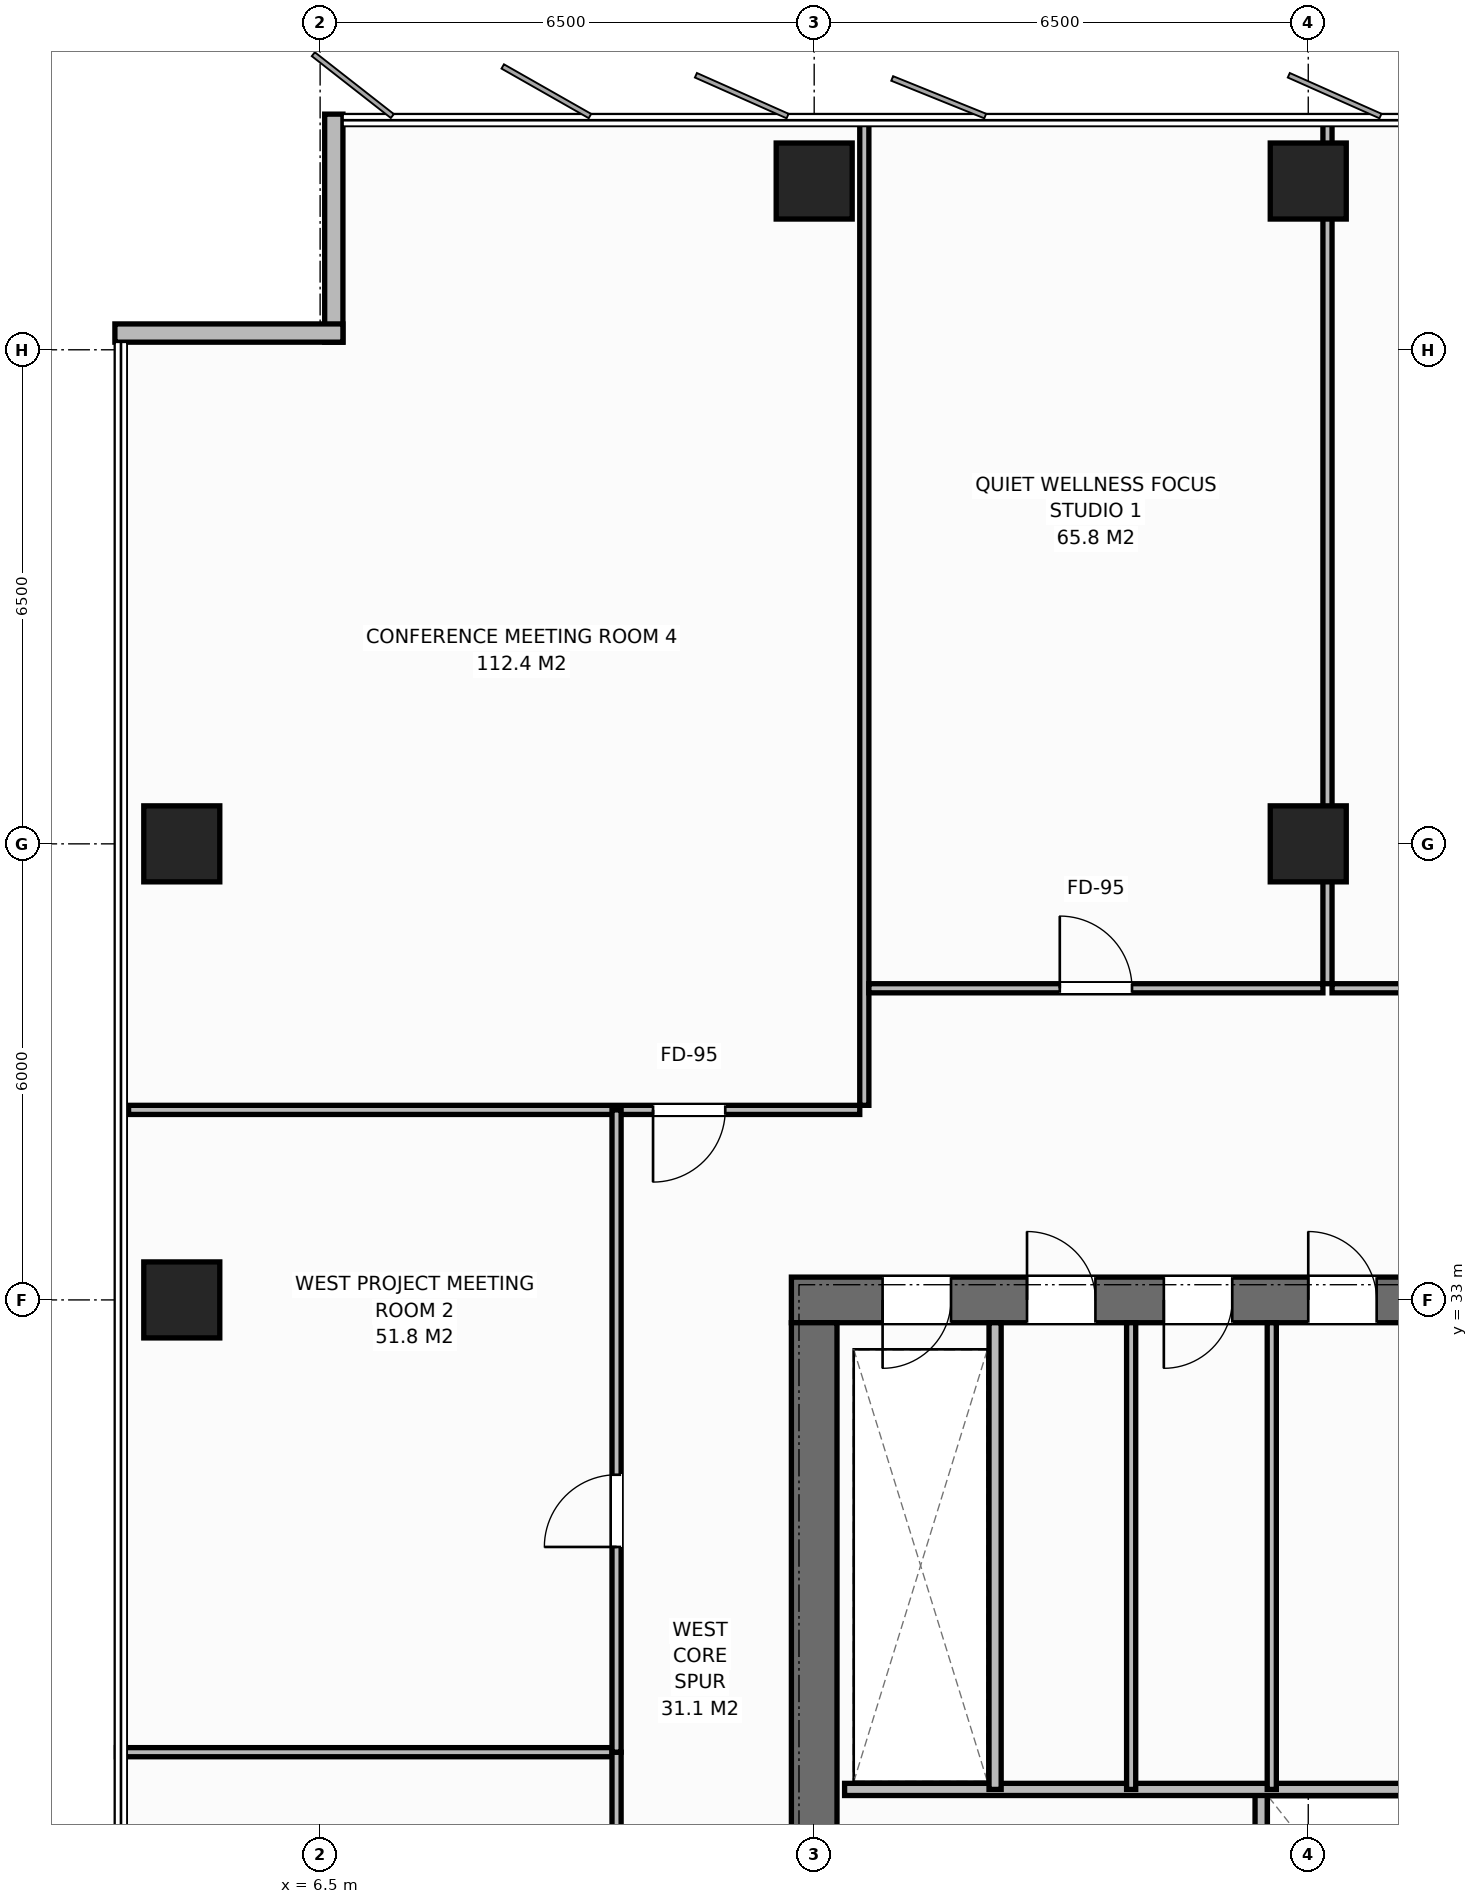
"""IFC4 building model, lengths in metres.
Left out: names, types, materials, properties, quantities, classifications, styles, units other than length and angle.
Written with IfcOpenShell. Run it as: python <this file> out.ifc"""

import sys

from ifc_helpers import new_model, si_unit, direction, frame, frame_2d, origin, origin_2d, place, context, subcontext, project, spatial, rectangle, extrude, element, fill, save


model = new_model("IFC4")
c1 = context("Model", 3, precision=1e-05, world=origin(), true_north=direction((0.0, 1.0)))
c2 = subcontext(c1, "Body", "Model", "MODEL_VIEW")
j1 = project(units=[si_unit("LENGTHUNIT", "METRE"), si_unit("PLANEANGLEUNIT", "RADIAN")], contexts=[c1])
p1 = place(None, origin())
s1 = spatial("IfcSite", under=j1, at=p1, CompositionType="ELEMENT")
p2 = place(p1, origin())
s2 = spatial("IfcBuilding", under=s1, at=p2, CompositionType="ELEMENT")
p3 = place(p2, frame((0.0, 0.0, 178.4)))
s3 = spatial("IfcBuildingStorey", under=s2, at=p3, CompositionType="ELEMENT", Elevation=178.4)
p4 = place(p3, frame((12.7, 33.0, 0.0), z_axis=(0.0, 0.0, 1.0), x_axis=(1.0, 0.0, 0.0)))
e1 = element("IfcWall", 1, at=p4, inside=s3, PredefinedType="SHEAR", context=c2, shape_type="SweptSolid", body=[
    extrude(rectangle(XDim=13.6, YDim=0.6, at=frame_2d((6.8, 0.0))), origin(), (0.0, 0.0, 1.0), 3.8),
])
p5 = place(p4, frame((1.2, 0.0, 0.0)))
e2 = element("IfcOpeningElement", 2, at=p5, cuts=e1, PredefinedType="OPENING", context=c2, shape_type="SweptSolid", body=[
    extrude(rectangle(XDim=0.9, YDim=2.15, at=frame_2d((0.45, 1.075))), frame((0.0, 0.31, 0.0), z_axis=(0.0, -1.0, 0.0), x_axis=(1.0, 0.0, 0.0)), (0.0, 0.0, 1.0), 0.62),
])
p6 = place(p4, frame((3.1, 0.0, 0.0)))
e3 = element("IfcOpeningElement", 3, at=p6, cuts=e1, PredefinedType="OPENING", context=c2, shape_type="SweptSolid", body=[
    extrude(rectangle(XDim=0.9, YDim=2.15, at=frame_2d((0.45, 1.075))), frame((0.0, 0.31, 0.0), z_axis=(0.0, -1.0, 0.0), x_axis=(1.0, 0.0, 0.0)), (0.0, 0.0, 1.0), 0.62),
])
p7 = place(p4, frame((4.9, 0.0, 0.0)))
e4 = element("IfcOpeningElement", 4, at=p7, cuts=e1, PredefinedType="OPENING", context=c2, shape_type="SweptSolid", body=[
    extrude(rectangle(XDim=0.9, YDim=2.15, at=frame_2d((0.45, 1.075))), frame((0.0, 0.31, 0.0), z_axis=(0.0, -1.0, 0.0), x_axis=(1.0, 0.0, 0.0)), (0.0, 0.0, 1.0), 0.62),
])
p8 = place(p4, frame((6.8, 0.0, 0.0)))
e5 = element("IfcOpeningElement", 5, at=p8, cuts=e1, PredefinedType="OPENING", context=c2, shape_type="SweptSolid", body=[
    extrude(rectangle(XDim=0.9, YDim=2.15, at=frame_2d((0.45, 1.075))), frame((0.0, 0.31, 0.0), z_axis=(0.0, -1.0, 0.0), x_axis=(1.0, 0.0, 0.0)), (0.0, 0.0, 1.0), 0.62),
])
p9 = place(p4, frame((9.18, 0.0, 0.0)))
e6 = element("IfcOpeningElement", 6, at=p9, cuts=e1, PredefinedType="OPENING", context=c2, shape_type="SweptSolid", body=[
    extrude(rectangle(XDim=1.4, YDim=2.2, at=frame_2d((0.7, 1.1))), frame((0.0, 0.31, 0.0), z_axis=(0.0, -1.0, 0.0), x_axis=(1.0, 0.0, 0.0)), (0.0, 0.0, 1.0), 0.62),
])
p10 = place(p3, frame((13.0, 19.3, 0.0), z_axis=(0.0, 0.0, 1.0), x_axis=(0.0, 1.0, 0.0)))
e7 = element("IfcWall", 7, at=p10, inside=s3, PredefinedType="SHEAR", context=c2, shape_type="SweptSolid", body=[
    extrude(rectangle(XDim=13.4, YDim=0.6, at=frame_2d((6.7, 0.0))), origin(), (0.0, 0.0, 1.0), 3.8),
])
p11 = place(p10, frame((4.75, 0.0, 0.0)))
e8 = element("IfcOpeningElement", 8, at=p11, cuts=e7, PredefinedType="OPENING", context=c2, shape_type="SweptSolid", body=[
    extrude(rectangle(XDim=1.4, YDim=2.2, at=frame_2d((0.7, 1.1))), frame((0.0, 0.31, 0.0), z_axis=(0.0, -1.0, 0.0), x_axis=(1.0, 0.0, 0.0)), (0.0, 0.0, 1.0), 0.62),
])
for number, where, z_axis, x_axis in (
    (9, (19.5, 39.0, 0.0), (0.0, 0.0, 1.0), (1.0, 0.0, 0.0)),
    (10, (13.0, 47.72, 0.0), (0.0, 0.0, 1.0), (1.0, 0.0, 0.0)),
    (11, (19.5, 47.72, 0.0), (0.0, 0.0, 1.0), (1.0, 0.0, 0.0)),
    (12, (4.68, 33.0, 0.0), (0.0, 0.0, 1.0), (1.0, 0.0, 0.0)),
    (13, (4.68, 39.0, 0.0), (0.0, 0.0, 1.0), (1.0, 0.0, 0.0)),
):
    element("IfcColumn", number, at=place(p3, frame(where, z_axis=z_axis, x_axis=x_axis)), inside=s3, PredefinedType="COLUMN", context=c2, shape_type="SweptSolid", body=[
        extrude(rectangle(XDim=1.0, YDim=1.0, at=origin_2d()), origin(), (0.0, 0.0, 1.0), 3.8),
    ])
for number, where, z_axis, x_axis in (
    (14, (6.68, 45.6, 0.0), (0.0, 0.0, 1.0), (0.0, 1.0, 0.0)),
    (15, (3.8, 45.72, 0.0), (0.0, 0.0, 1.0), (1.0, 0.0, 0.0)),
):
    element("IfcWall", number, at=place(p3, frame(where, z_axis=z_axis, x_axis=x_axis)), inside=s3, PredefinedType="STANDARD", context=c2, shape_type="SweptSolid", body=[
        extrude(rectangle(XDim=3.0, YDim=0.24, at=frame_2d((1.5, 0.0))), origin(), (0.0, 0.0, 1.0), 3.572),
    ])
p12 = place(p3, frame((18.88, 23.09, 0.0), z_axis=(0.0, 0.0, 1.0), x_axis=(0.0, 1.0, 0.0)))
e16 = element("IfcWall", 16, at=p12, inside=s3, PredefinedType="STANDARD", context=c2, shape_type="SweptSolid", body=[
    extrude(rectangle(XDim=3.47, YDim=0.16, at=frame_2d((1.735, 0.0))), origin(), (0.0, 0.0, 1.0), 3.572),
])
p13 = place(p12, frame((1.1, 0.0, 0.0)))
e17 = element("IfcOpeningElement", 17, at=p13, cuts=e16, PredefinedType="OPENING", context=c2, shape_type="SweptSolid", body=[
    extrude(rectangle(XDim=1.1, YDim=2.2, at=frame_2d((0.55, 1.1))), frame((0.0, 0.09, 0.0), z_axis=(0.0, -1.0, 0.0), x_axis=(1.0, 0.0, 0.0)), (0.0, 0.0, 1.0), 0.18),
])
p14 = place(p3, frame((13.4, 26.56, 0.0), z_axis=(0.0, 0.0, 1.0), x_axis=(1.0, 0.0, 0.0)))
e18 = element("IfcWall", 18, at=p14, inside=s3, PredefinedType="STANDARD", context=c2, shape_type="SweptSolid", body=[
    extrude(rectangle(XDim=8.34, YDim=0.16, at=frame_2d((4.17, 0.0))), origin(), (0.0, 0.0, 1.0), 3.572),
])
p15 = place(p3, frame((15.38, 26.56, 0.0), z_axis=(0.0, 0.0, 1.0), x_axis=(0.0, 1.0, 0.0)))
e19 = element("IfcWall", 19, at=p15, inside=s3, PredefinedType="STANDARD", context=c2, shape_type="SweptSolid", body=[
    extrude(rectangle(XDim=6.14, YDim=0.16, at=frame_2d((3.07, 0.0))), origin(), (0.0, 0.0, 1.0), 3.572),
])
for number, where, z_axis, x_axis in (
    (20, (17.17, 26.56, 0.0), (0.0, 0.0, 1.0), (0.0, 1.0, 0.0)),
    (21, (19.02, 26.56, 0.0), (0.0, 0.0, 1.0), (0.0, 1.0, 0.0)),
):
    element("IfcWall", number, at=place(p3, frame(where, z_axis=z_axis, x_axis=x_axis)), inside=s3, PredefinedType="PARTITIONING", context=c2, shape_type="SweptSolid", body=[
        extrude(rectangle(XDim=6.14, YDim=0.12, at=frame_2d((3.07, 0.0))), origin(), (0.0, 0.0, 1.0), 3.572),
    ])
p16 = place(p3, frame((13.659, 35.56, 0.0), z_axis=(0.0, 0.0, 1.0), x_axis=(0.0, 1.0, 0.0)))
e22 = element("IfcWall", 22, at=p16, inside=s3, PredefinedType="PARTITIONING", context=c2, shape_type="SweptSolid", body=[
    extrude(rectangle(XDim=13.02, YDim=0.12, at=frame_2d((6.51, 0.0))), origin(), (0.0, 0.0, 1.0), 3.572),
])
p17 = place(p3, frame((3.98, 35.5, 0.0), z_axis=(0.0, 0.0, 1.0), x_axis=(1.0, 0.0, 0.0)))
e23 = element("IfcWall", 23, at=p17, inside=s3, PredefinedType="PARTITIONING", context=c2, shape_type="SweptSolid", body=[
    extrude(rectangle(XDim=9.62, YDim=0.12, at=frame_2d((4.81, 0.0))), origin(), (0.0, 0.0, 1.0), 3.572),
])
p18 = place(p17, frame((6.9, 0.0, 0.0)))
e24 = element("IfcOpeningElement", 24, at=p18, cuts=e23, PredefinedType="OPENING", context=c2, shape_type="SweptSolid", body=[
    extrude(rectangle(XDim=0.95, YDim=2.15, at=frame_2d((0.475, 1.075))), frame((0.0, 0.07, 0.0), z_axis=(0.0, -1.0, 0.0), x_axis=(1.0, 0.0, 0.0)), (0.0, 0.0, 1.0), 0.14),
])
p19 = place(p3, frame((19.753, 37.16, 0.0), z_axis=(0.0, 0.0, 1.0), x_axis=(0.0, 1.0, 0.0)))
e25 = element("IfcWall", 25, at=p19, inside=s3, PredefinedType="PARTITIONING", context=c2, shape_type="SweptSolid", body=[
    extrude(rectangle(XDim=11.42, YDim=0.12, at=frame_2d((5.71, 0.0))), origin(), (0.0, 0.0, 1.0), 3.572),
])
p20 = place(p3, frame((13.719, 37.1, 0.0), z_axis=(0.0, 0.0, 1.0), x_axis=(1.0, 0.0, 0.0)))
e26 = element("IfcWall", 26, at=p20, inside=s3, PredefinedType="PARTITIONING", context=c2, shape_type="SweptSolid", body=[
    extrude(rectangle(XDim=5.974, YDim=0.12, at=frame_2d((2.987, 0.0))), origin(), (0.0, 0.0, 1.0), 3.572),
])
p21 = place(p20, frame((2.512, 0.0, 0.0)))
e27 = element("IfcOpeningElement", 27, at=p21, cuts=e26, PredefinedType="OPENING", context=c2, shape_type="SweptSolid", body=[
    extrude(rectangle(XDim=0.95, YDim=2.15, at=frame_2d((0.475, 1.075))), frame((0.0, 0.07, 0.0), z_axis=(0.0, -1.0, 0.0), x_axis=(1.0, 0.0, 0.0)), (0.0, 0.0, 1.0), 0.14),
])
p22 = place(p3, frame((19.813, 37.1, 0.0), z_axis=(0.0, 0.0, 1.0), x_axis=(1.0, 0.0, 0.0)))
e28 = element("IfcWall", 28, at=p22, inside=s3, PredefinedType="PARTITIONING", context=c2, shape_type="SweptSolid", body=[
    extrude(rectangle(XDim=10.057, YDim=0.12, at=frame_2d((5.028, 0.0))), origin(), (0.0, 0.0, 1.0), 3.572),
])
p23 = place(p22, frame((8.627, 0.0, 0.0)))
e29 = element("IfcOpeningElement", 29, at=p23, cuts=e28, PredefinedType="OPENING", context=c2, shape_type="SweptSolid", body=[
    extrude(rectangle(XDim=0.95, YDim=2.15, at=frame_2d((0.475, 1.075))), frame((0.0, 0.07, 0.0), z_axis=(0.0, -1.0, 0.0), x_axis=(1.0, 0.0, 0.0)), (0.0, 0.0, 1.0), 0.14),
])
p24 = place(p3, frame((3.82, 27.05, 0.0), z_axis=(0.0, 0.0, 1.0), x_axis=(1.0, 0.0, 0.0)))
e30 = element("IfcWall", 30, at=p24, inside=s3, PredefinedType="PARTITIONING", context=c2, shape_type="SweptSolid", body=[
    extrude(rectangle(XDim=6.58, YDim=0.12, at=frame_2d((3.29, 0.0))), origin(), (0.0, 0.0, 1.0), 3.572),
])
p25 = place(p3, frame((10.4, 18.6, 0.0), z_axis=(0.0, 0.0, 1.0), x_axis=(0.0, 1.0, 0.0)))
e31 = element("IfcWall", 31, at=p25, inside=s3, PredefinedType="PARTITIONING", context=c2, shape_type="SweptSolid", body=[
    extrude(rectangle(XDim=8.45, YDim=0.12, at=frame_2d((4.225, 0.0))), origin(), (0.0, 0.0, 1.0), 3.572),
])
p26 = place(p25, frame((3.75, 0.0, 0.0)))
e32 = element("IfcOpeningElement", 32, at=p26, cuts=e31, PredefinedType="OPENING", context=c2, shape_type="SweptSolid", body=[
    extrude(rectangle(XDim=0.95, YDim=2.15, at=frame_2d((0.475, 1.075))), frame((0.0, 0.07, 0.0), z_axis=(0.0, -1.0, 0.0), x_axis=(1.0, 0.0, 0.0)), (0.0, 0.0, 1.0), 0.14),
])
p27 = place(p3, frame((10.4, 27.05, 0.0), z_axis=(0.0, 0.0, 1.0), x_axis=(0.0, 1.0, 0.0)))
e33 = element("IfcWall", 33, at=p27, inside=s3, PredefinedType="PARTITIONING", context=c2, shape_type="SweptSolid", body=[
    extrude(rectangle(XDim=8.45, YDim=0.12, at=frame_2d((4.225, 0.0))), origin(), (0.0, 0.0, 1.0), 3.572),
])
p28 = place(p27, frame((2.7, 0.0, 0.0)))
e34 = element("IfcOpeningElement", 34, at=p28, cuts=e33, PredefinedType="OPENING", context=c2, shape_type="SweptSolid", body=[
    extrude(rectangle(XDim=0.95, YDim=2.15, at=frame_2d((0.475, 1.075))), frame((0.0, 0.07, 0.0), z_axis=(0.0, -1.0, 0.0), x_axis=(1.0, 0.0, 0.0)), (0.0, 0.0, 1.0), 0.14),
])
p29 = place(p5, origin())
e35 = element("IfcDoor", 35, at=p29, inside=s3, OperationType="SINGLE_SWING_RIGHT", PredefinedType="DOOR", context=c2, shape_type="SweptSolid", body=[
    extrude(rectangle(XDim=0.9, YDim=2.15, at=frame_2d((0.45, 1.075))), frame((0.0, -0.025, 0.0), z_axis=(0.0, -1.0, 0.0), x_axis=(1.0, 0.0, 0.0)), (0.0, 0.0, 1.0), 0.05),
])
fill(e2, e35)
p30 = place(p6, origin())
e36 = element("IfcDoor", 36, at=p30, inside=s3, OperationType="SINGLE_SWING_LEFT", PredefinedType="DOOR", context=c2, shape_type="SweptSolid", body=[
    extrude(rectangle(XDim=0.9, YDim=2.15, at=frame_2d((0.45, 1.075))), frame((0.0, -0.025, 0.0), z_axis=(0.0, -1.0, 0.0), x_axis=(1.0, 0.0, 0.0)), (0.0, 0.0, 1.0), 0.05),
])
fill(e3, e36)
p31 = place(p7, origin())
e37 = element("IfcDoor", 37, at=p31, inside=s3, OperationType="SINGLE_SWING_RIGHT", PredefinedType="DOOR", context=c2, shape_type="SweptSolid", body=[
    extrude(rectangle(XDim=0.9, YDim=2.15, at=frame_2d((0.45, 1.075))), frame((0.0, -0.025, 0.0), z_axis=(0.0, -1.0, 0.0), x_axis=(1.0, 0.0, 0.0)), (0.0, 0.0, 1.0), 0.05),
])
fill(e4, e37)
p32 = place(p8, origin())
e38 = element("IfcDoor", 38, at=p32, inside=s3, OperationType="SINGLE_SWING_LEFT", PredefinedType="DOOR", context=c2, shape_type="SweptSolid", body=[
    extrude(rectangle(XDim=0.9, YDim=2.15, at=frame_2d((0.45, 1.075))), frame((0.0, -0.025, 0.0), z_axis=(0.0, -1.0, 0.0), x_axis=(1.0, 0.0, 0.0)), (0.0, 0.0, 1.0), 0.05),
])
fill(e5, e38)
p33 = place(p18, origin())
e39 = element("IfcDoor", 39, at=p33, inside=s3, OperationType="SINGLE_SWING_RIGHT", PredefinedType="DOOR", context=c2, shape_type="SweptSolid", body=[
    extrude(rectangle(XDim=0.95, YDim=2.15, at=frame_2d((0.475, 1.075))), frame((0.0, 0.025, 0.0), z_axis=(0.0, -1.0, 0.0), x_axis=(1.0, 0.0, 0.0)), (0.0, 0.0, 1.0), 0.05),
])
fill(e24, e39)
p34 = place(p21, origin())
e40 = element("IfcDoor", 40, at=p34, inside=s3, OperationType="SINGLE_SWING_LEFT", PredefinedType="DOOR", context=c2, shape_type="SweptSolid", body=[
    extrude(rectangle(XDim=0.95, YDim=2.15, at=frame_2d((0.475, 1.075))), frame((0.0, 0.025, 0.0), z_axis=(0.0, -1.0, 0.0), x_axis=(1.0, 0.0, 0.0)), (0.0, 0.0, 1.0), 0.05),
])
fill(e27, e40)
p35 = place(p28, origin())
e41 = element("IfcDoor", 41, at=p35, inside=s3, OperationType="SINGLE_SWING_LEFT", PredefinedType="DOOR", context=c2, shape_type="SweptSolid", body=[
    extrude(rectangle(XDim=0.95, YDim=2.15, at=frame_2d((0.475, 1.075))), frame((0.0, 0.025, 0.0), z_axis=(0.0, -1.0, 0.0), x_axis=(1.0, 0.0, 0.0)), (0.0, 0.0, 1.0), 0.05),
])
fill(e34, e41)
save(model, sys.argv[1])
